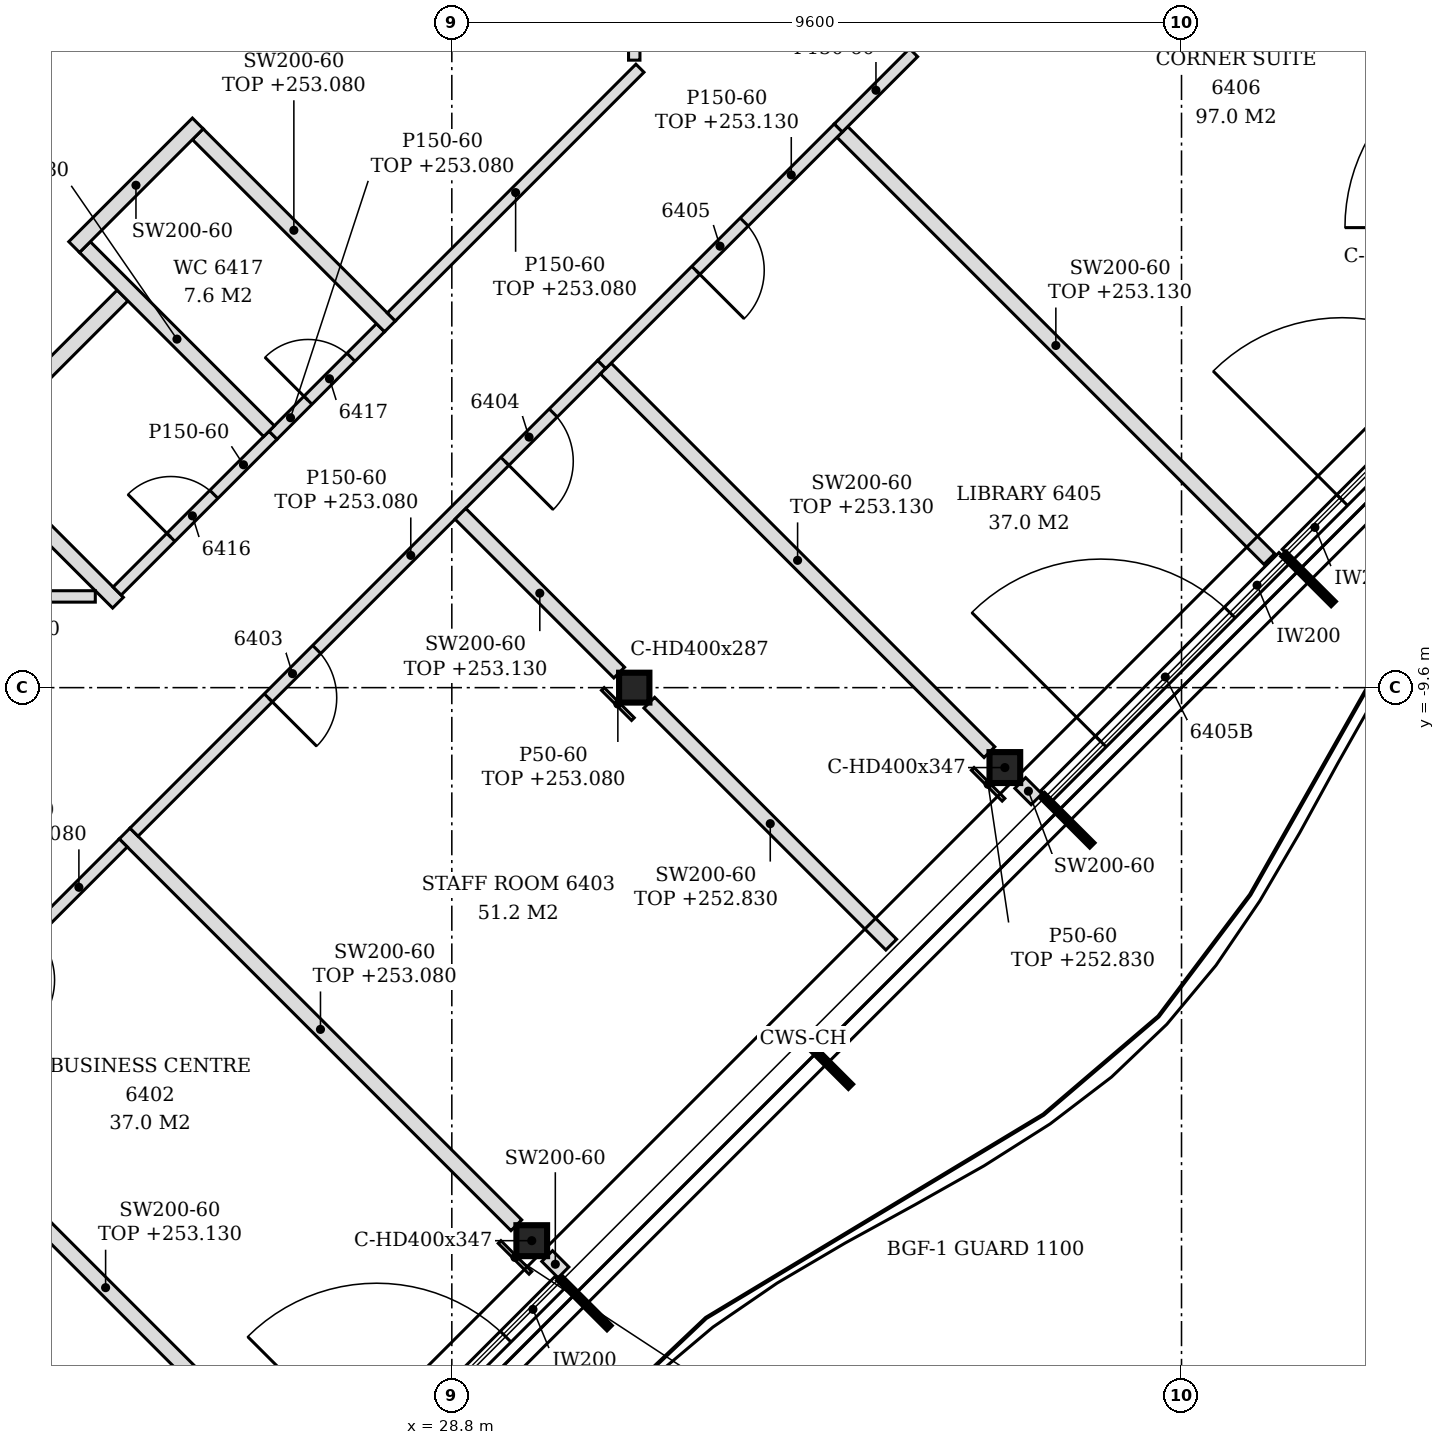
"""IFC4 building model, lengths in metres.
Left out: names, types, materials, properties, quantities, classifications, styles, units other than length and angle.
Written with IfcOpenShell. Run it as: python <this file> out.ifc"""

import sys

from ifc_helpers import new_model, si_unit, direction, frame, frame_2d, origin, origin_2d, place, context, subcontext, project, spatial, rectangle, i_section, extrude, element, fill, save


model = new_model("IFC4")
c1 = context("Model", 3, precision=1e-05, world=origin(), true_north=direction((0.0, 1.0)))
c2 = subcontext(c1, "Body", "Model", "MODEL_VIEW")
j1 = project(units=[si_unit("LENGTHUNIT", "METRE"), si_unit("PLANEANGLEUNIT", "RADIAN")], contexts=[c1])
p1 = place(None, origin())
s1 = spatial("IfcSite", under=j1, at=p1, CompositionType="ELEMENT")
p2 = place(p1, origin())
s2 = spatial("IfcBuilding", under=s1, at=p2, CompositionType="ELEMENT")
p3 = place(p2, frame((0.0, 0.0, 250.2)))
s3 = spatial("IfcBuildingStorey", under=s2, at=p3, CompositionType="ELEMENT", Elevation=250.2)
for number, where, z_axis, x_axis in (
    (1, (29.852, -16.876, -0.15), (0.0, 0.0, 1.0), (1.0, 0.0, 0.0)),
    (2, (36.076, -10.652, -0.15), (0.0, 0.0, 1.0), (1.0, 0.0, 0.0)),
):
    element("IfcColumn", number, at=place(p3, frame(where, z_axis=z_axis, x_axis=x_axis)), inside=s3, PredefinedType="COLUMN", context=c2, shape_type="SweptSolid", body=[
        extrude(i_section(OverallWidth=0.404, OverallDepth=0.407, WebThickness=0.027, FlangeThickness=0.044, FilletRadius=0.015, at=origin_2d()), origin(), (0.0, 0.0, 1.0), 3.6),
    ])
p4 = place(p3, frame((31.2, -9.6, -0.15), z_axis=(0.0, 0.0, 1.0), x_axis=(1.0, 0.0, 0.0)))
e3 = element("IfcColumn", 3, at=p4, inside=s3, PredefinedType="COLUMN", context=c2, shape_type="SweptSolid", body=[
    extrude(i_section(OverallWidth=0.399, OverallDepth=0.393, WebThickness=0.023, FlangeThickness=0.037, FilletRadius=0.015, at=origin_2d()), origin(), (0.0, 0.0, 1.0), 3.6),
])
p5 = place(p3, frame((27.093, -20.553, 0.0), z_axis=(0.0, 0.0, 1.0), x_axis=(0.707079231393, 0.707134329907, 0.0)))
e4 = element("IfcWall", 4, at=p5, inside=s3, PredefinedType="NOTDEFINED", context=c2, shape_type="SweptSolid", body=[
    extrude(rectangle(XDim=4.431, YDim=0.2, at=frame_2d((2.215, 0.0))), origin(), (0.0, 0.0, 1.0), 3.45),
])
p6 = place(p5, frame((1.015, 0.0, 0.0)))
e5 = element("IfcOpeningElement", 5, at=p6, cuts=e4, PredefinedType="OPENING", context=c2, shape_type="SweptSolid", body=[
    extrude(rectangle(XDim=2.4, YDim=2.4, at=frame_2d((1.2, 1.2))), frame((0.0, 0.11, 0.0), z_axis=(0.0, -1.0, 0.0), x_axis=(1.0, 0.0, 0.0)), (0.0, 0.0, 1.0), 0.22),
])
p7 = place(p3, frame((36.62, -11.026, 0.0), z_axis=(0.0, 0.0, 1.0), x_axis=(0.707106781187, 0.707106781187, 0.0)))
e6 = element("IfcWall", 6, at=p7, inside=s3, PredefinedType="NOTDEFINED", context=c2, shape_type="SweptSolid", body=[
    extrude(rectangle(XDim=4.431, YDim=0.2, at=frame_2d((2.215, 0.0))), origin(), (0.0, 0.0, 1.0), 3.45),
])
p8 = place(p7, frame((1.015, 0.0, 0.0)))
e7 = element("IfcOpeningElement", 7, at=p8, cuts=e6, PredefinedType="OPENING", context=c2, shape_type="SweptSolid", body=[
    extrude(rectangle(XDim=2.4, YDim=2.4, at=frame_2d((1.2, 1.2))), frame((0.0, 0.11, 0.0), z_axis=(0.0, -1.0, 0.0), x_axis=(1.0, 0.0, 0.0)), (0.0, 0.0, 1.0), 0.22),
])
p9 = place(p3, frame((39.796, -7.851, 0.0), z_axis=(0.0, 0.0, 1.0), x_axis=(0.707079168996, 0.707134392299, 0.0)))
e8 = element("IfcWall", 8, at=p9, inside=s3, PredefinedType="NOTDEFINED", context=c2, shape_type="SweptSolid", body=[
    extrude(rectangle(XDim=4.421, YDim=0.2, at=frame_2d((2.21, 0.0))), origin(), (0.0, 0.0, 1.0), 3.45),
])
p10 = place(p9, frame((1.016, 0.0, 0.0)))
e9 = element("IfcOpeningElement", 9, at=p10, cuts=e8, PredefinedType="OPENING", context=c2, shape_type="SweptSolid", body=[
    extrude(rectangle(XDim=2.4, YDim=2.4, at=frame_2d((1.2, 1.2))), frame((0.0, 0.11, 0.0), z_axis=(0.0, -1.0, 0.0), x_axis=(1.0, 0.0, 0.0)), (0.0, 0.0, 1.0), 0.22),
])
p11 = place(p3, frame((27.107, -20.355, 0.0), z_axis=(0.0, 0.0, 1.0), x_axis=(-0.707182179369, 0.707031374964, 0.0)))
e10 = element("IfcWall", 10, at=p11, inside=s3, PredefinedType="PARTITIONING", context=c2, shape_type="SweptSolid", body=[
    extrude(rectangle(XDim=8.095, YDim=0.2, at=frame_2d((4.047, 0.0))), origin(), (0.0, 0.0, 1.0), 2.93),
])
p12 = place(p3, frame((30.269, -17.293, 0.0), z_axis=(0.0, 0.0, 1.0), x_axis=(-0.707509117806, 0.706704215511, 0.0)))
e11 = element("IfcWall", 11, at=p12, inside=s3, PredefinedType="PARTITIONING", context=c2, shape_type="SweptSolid", body=[
    extrude(rectangle(XDim=0.303, YDim=0.2, at=frame_2d((0.152, 0.0))), origin(), (0.0, 0.0, 1.0), 3.45),
])
p13 = place(p3, frame((29.649, -16.673, 0.0), z_axis=(0.0, 0.0, 1.0), x_axis=(-0.707106781187, 0.707106781187, 0.0)))
e12 = element("IfcWall", 12, at=p13, inside=s3, PredefinedType="PARTITIONING", context=c2, shape_type="SweptSolid", body=[
    extrude(rectangle(XDim=7.289, YDim=0.2, at=frame_2d((3.644, 0.0))), origin(), (0.0, 0.0, 1.0), 2.88),
])
p14 = place(p3, frame((21.507, -14.614, 0.0), z_axis=(0.0, 0.0, 1.0), x_axis=(0.706990566745, 0.707222976531, 0.0)))
e13 = element("IfcWall", 13, at=p14, inside=s3, PredefinedType="PARTITIONING", context=c2, shape_type="SweptSolid", body=[
    extrude(rectangle(XDim=4.202, YDim=0.15, at=frame_2d((2.101, 0.0))), origin(), (0.0, 0.0, 1.0), 2.88),
])
p15 = place(p14, frame((1.651, 0.0, 0.0)))
e14 = element("IfcOpeningElement", 14, at=p15, cuts=e13, PredefinedType="OPENING", context=c2, shape_type="SweptSolid", body=[
    extrude(rectangle(XDim=0.9, YDim=2.1, at=frame_2d((0.45, 1.05))), frame((0.0, 0.085, 0.0), z_axis=(0.0, -1.0, 0.0), x_axis=(1.0, 0.0, 0.0)), (0.0, 0.0, 1.0), 0.17),
])
p16 = place(p3, frame((34.581, -12.981, 0.0), z_axis=(0.0, 0.0, 1.0), x_axis=(-0.707133900936, 0.707079660397, 0.0)))
e15 = element("IfcWall", 15, at=p16, inside=s3, PredefinedType="PARTITIONING", context=c2, shape_type="SweptSolid", body=[
    extrude(rectangle(XDim=4.501, YDim=0.2, at=frame_2d((2.25, 0.0))), origin(), (0.0, 0.0, 1.0), 2.63),
])
p17 = place(p3, frame((24.619, -11.501, 0.0), z_axis=(0.0, 0.0, 1.0), x_axis=(0.707106781187, 0.707106781187, 0.0)))
e16 = element("IfcWall", 16, at=p17, inside=s3, PredefinedType="PARTITIONING", context=c2, shape_type="SweptSolid", body=[
    extrude(rectangle(XDim=8.702, YDim=0.15, at=frame_2d((4.351, 0.0))), origin(), (0.0, 0.0, 1.0), 2.88),
])
p18 = place(p17, frame((2.499, 0.0, 0.0)))
e17 = element("IfcOpeningElement", 17, at=p18, cuts=e16, PredefinedType="OPENING", context=c2, shape_type="SweptSolid", body=[
    extrude(rectangle(XDim=0.9, YDim=2.1, at=frame_2d((0.45, 1.05))), frame((0.0, 0.085, 0.0), z_axis=(0.0, -1.0, 0.0), x_axis=(1.0, 0.0, 0.0)), (0.0, 0.0, 1.0), 0.17),
])
p19 = place(p17, frame((6.9, 0.0, 0.0)))
e18 = element("IfcOpeningElement", 18, at=p19, cuts=e16, PredefinedType="OPENING", context=c2, shape_type="SweptSolid", body=[
    extrude(rectangle(XDim=0.9, YDim=2.1, at=frame_2d((0.45, 1.05))), frame((0.0, 0.085, 0.0), z_axis=(0.0, -1.0, 0.0), x_axis=(1.0, 0.0, 0.0)), (0.0, 0.0, 1.0), 0.17),
])
p20 = place(p3, frame((36.493, -11.069, 0.0), z_axis=(0.0, 0.0, 1.0), x_axis=(-0.707106781187, 0.707106781187, 0.0)))
e19 = element("IfcWall", 19, at=p20, inside=s3, PredefinedType="PARTITIONING", context=c2, shape_type="SweptSolid", body=[
    extrude(rectangle(XDim=0.303, YDim=0.2, at=frame_2d((0.152, 0.0))), origin(), (0.0, 0.0, 1.0), 3.45),
])
p21 = place(p3, frame((35.873, -10.449, 0.0), z_axis=(0.0, 0.0, 1.0), x_axis=(-0.707089680867, 0.707123881093, 0.0)))
e20 = element("IfcWall", 20, at=p21, inside=s3, PredefinedType="PARTITIONING", context=c2, shape_type="SweptSolid", body=[
    extrude(rectangle(XDim=7.139, YDim=0.2, at=frame_2d((3.569, 0.0))), origin(), (0.0, 0.0, 1.0), 2.93),
])
p22 = place(p3, frame((31.002, -9.402, 0.0), z_axis=(0.0, 0.0, 1.0), x_axis=(-0.707065460118, 0.70714809984, 0.0)))
e21 = element("IfcWall", 21, at=p22, inside=s3, PredefinedType="PARTITIONING", context=c2, shape_type="SweptSolid", body=[
    extrude(rectangle(XDim=2.954, YDim=0.2, at=frame_2d((1.477, 0.0))), origin(), (0.0, 0.0, 1.0), 2.93),
])
p23 = place(p3, frame((24.408, -8.482, 0.0), z_axis=(0.0, 0.0, 1.0), x_axis=(-0.707061835578, 0.707151723938, 0.0)))
e22 = element("IfcWall", 22, at=p23, inside=s3, PredefinedType="PARTITIONING", context=c2, shape_type="SweptSolid", body=[
    extrude(rectangle(XDim=2.716, YDim=0.2, at=frame_2d((1.358, 0.0))), origin(), (0.0, 0.0, 1.0), 3.45),
])
p24 = place(p3, frame((21.215, -8.4, 0.0), z_axis=(0.0, 0.0, 1.0), x_axis=(1.0, 0.0, 0.0)))
e23 = element("IfcWall", 23, at=p24, inside=s3, PredefinedType="PARTITIONING", context=c2, shape_type="SweptSolid", body=[
    extrude(rectangle(XDim=2.895, YDim=0.15, at=frame_2d((1.447, 0.0))), origin(), (0.0, 0.0, 1.0), 3.45),
])
p25 = place(p3, frame((24.397, -8.329, 0.0), z_axis=(0.0, 0.0, 1.0), x_axis=(0.707275119896, 0.706938402391, 0.0)))
e24 = element("IfcWall", 24, at=p25, inside=s3, PredefinedType="PARTITIONING", context=c2, shape_type="SweptSolid", body=[
    extrude(rectangle(XDim=2.9, YDim=0.15, at=frame_2d((1.45, 0.0))), origin(), (0.0, 0.0, 1.0), 3.45),
])
p26 = place(p25, frame((1.0, 0.0, 0.0)))
e25 = element("IfcOpeningElement", 25, at=p26, cuts=e24, PredefinedType="OPENING", context=c2, shape_type="SweptSolid", body=[
    extrude(rectangle(XDim=0.8, YDim=2.1, at=frame_2d((0.4, 1.05))), frame((0.0, 0.085, 0.0), z_axis=(0.0, -1.0, 0.0), x_axis=(1.0, 0.0, 0.0)), (0.0, 0.0, 1.0), 0.17),
])
p27 = place(p3, frame((39.555, -7.907, 0.0), z_axis=(0.0, 0.0, 1.0), x_axis=(-0.707060685068, 0.7071528743, 0.0)))
e26 = element("IfcWall", 26, at=p27, inside=s3, PredefinedType="PARTITIONING", context=c2, shape_type="SweptSolid", body=[
    extrude(rectangle(XDim=7.945, YDim=0.2, at=frame_2d((3.972, 0.0))), origin(), (0.0, 0.0, 1.0), 2.93),
])
p28 = place(p3, frame((22.346, -6.562, 0.0), z_axis=(0.0, 0.0, 1.0), x_axis=(0.707269502796, 0.706944022123, 0.0)))
e27 = element("IfcWall", 27, at=p28, inside=s3, PredefinedType="PARTITIONING", context=c2, shape_type="SweptSolid", body=[
    extrude(rectangle(XDim=3.0, YDim=0.2, at=frame_2d((1.5, 0.0))), origin(), (0.0, 0.0, 1.0), 2.88),
])
p29 = place(p3, frame((26.448, -6.279, 0.0), z_axis=(0.0, 0.0, 1.0), x_axis=(0.707106781187, 0.707106781187, 0.0)))
e28 = element("IfcWall", 28, at=p29, inside=s3, PredefinedType="PARTITIONING", context=c2, shape_type="SweptSolid", body=[
    extrude(rectangle(XDim=2.0, YDim=0.15, at=frame_2d((1.0, 0.0))), origin(), (0.0, 0.0, 1.0), 2.88),
])
p30 = place(p29, frame((0.65, 0.0, 0.0)))
e29 = element("IfcOpeningElement", 29, at=p30, cuts=e28, PredefinedType="OPENING", context=c2, shape_type="SweptSolid", body=[
    extrude(rectangle(XDim=0.8, YDim=2.1, at=frame_2d((0.4, 1.05))), frame((0.0, 0.085, 0.0), z_axis=(0.0, -1.0, 0.0), x_axis=(1.0, 0.0, 0.0)), (0.0, 0.0, 1.0), 0.17),
])
p31 = place(p3, frame((26.395, -6.226, 0.0), z_axis=(0.0, 0.0, 1.0), x_axis=(-0.707106781187, 0.707106781187, 0.0)))
e30 = element("IfcWall", 30, at=p31, inside=s3, PredefinedType="PARTITIONING", context=c2, shape_type="SweptSolid", body=[
    extrude(rectangle(XDim=3.426, YDim=0.2, at=frame_2d((1.713, 0.0))), origin(), (0.0, 0.0, 1.0), 2.88),
])
p32 = place(p3, frame((30.772, -5.348, 0.0), z_axis=(0.0, 0.0, 1.0), x_axis=(0.70724543229, 0.706968102891, 0.0)))
e31 = element("IfcWall", 31, at=p32, inside=s3, PredefinedType="PARTITIONING", context=c2, shape_type="SweptSolid", body=[
    extrude(rectangle(XDim=4.402, YDim=0.15, at=frame_2d((2.201, 0.0))), origin(), (0.0, 0.0, 1.0), 2.93),
])
p33 = place(p32, frame((1.751, 0.0, 0.0)))
e32 = element("IfcOpeningElement", 32, at=p33, cuts=e31, PredefinedType="OPENING", context=c2, shape_type="SweptSolid", body=[
    extrude(rectangle(XDim=0.9, YDim=2.1, at=frame_2d((0.45, 1.05))), frame((0.0, 0.085, 0.0), z_axis=(0.0, -1.0, 0.0), x_axis=(1.0, 0.0, 0.0)), (0.0, 0.0, 1.0), 0.17),
])
p34 = place(p3, frame((27.986, -4.847, 0.0), z_axis=(0.0, 0.0, 1.0), x_axis=(-0.707106781187, 0.707106781187, 0.0)))
e33 = element("IfcWall", 33, at=p34, inside=s3, PredefinedType="PARTITIONING", context=c2, shape_type="SweptSolid", body=[
    extrude(rectangle(XDim=3.576, YDim=0.2, at=frame_2d((1.788, 0.0))), origin(), (0.0, 0.0, 1.0), 2.88),
])
p35 = place(p3, frame((28.004, -4.723, 0.0), z_axis=(0.0, 0.0, 1.0), x_axis=(0.706974860744, 0.707238677022, 0.0)))
e34 = element("IfcWall", 34, at=p35, inside=s3, PredefinedType="PARTITIONING", context=c2, shape_type="SweptSolid", body=[
    extrude(rectangle(XDim=4.627, YDim=0.15, at=frame_2d((2.313, 0.0))), origin(), (0.0, 0.0, 1.0), 2.88),
])
p36 = place(p3, frame((23.831, -3.804, 0.0), z_axis=(0.0, 0.0, 1.0), x_axis=(0.707106781187, 0.707106781187, 0.0)))
e35 = element("IfcWall", 35, at=p36, inside=s3, PredefinedType="PARTITIONING", context=c2, shape_type="SweptSolid", body=[
    extrude(rectangle(XDim=2.3, YDim=0.2, at=frame_2d((1.15, 0.0))), origin(), (0.0, 0.0, 1.0), 3.45),
])
p37 = place(p3, frame((33.885, -2.236, 0.0), z_axis=(0.0, 0.0, 1.0), x_axis=(0.707106781187, 0.707106781187, 0.0)))
e36 = element("IfcWall", 36, at=p37, inside=s3, PredefinedType="PARTITIONING", context=c2, shape_type="SweptSolid", body=[
    extrude(rectangle(XDim=1.4, YDim=0.15, at=frame_2d((0.7, 0.0))), origin(), (0.0, 0.0, 1.0), 3.45),
])
p38 = place(p3, frame((31.2, -1.345, 0.0), z_axis=(0.0, 0.0, 1.0), x_axis=(0.0, 1.0, 0.0)))
e37 = element("IfcWall", 37, at=p38, inside=s3, PredefinedType="PARTITIONING", context=c2, shape_type="SweptSolid", body=[
    extrude(rectangle(XDim=1.148, YDim=0.15, at=frame_2d((0.574, 0.0))), origin(), (0.0, 0.0, 1.0), 2.93),
])
p39 = place(p3, frame((29.834, -17.299, 0.0), z_axis=(0.0, 0.0, 1.0), x_axis=(-0.707106781187, 0.707106781187, 0.0)))
e38 = element("IfcWall", 38, at=p39, inside=s3, PredefinedType="PARTITIONING", context=c2, shape_type="SweptSolid", body=[
    extrude(rectangle(XDim=0.573, YDim=0.05, at=frame_2d((0.287, 0.0))), origin(), (0.0, 0.0, 1.0), 2.93),
])
p40 = place(p3, frame((31.182, -10.014, 0.0), z_axis=(0.0, 0.0, 1.0), x_axis=(-0.707106781187, 0.707106781187, 0.0)))
e39 = element("IfcWall", 39, at=p40, inside=s3, PredefinedType="PARTITIONING", context=c2, shape_type="SweptSolid", body=[
    extrude(rectangle(XDim=0.56, YDim=0.05, at=frame_2d((0.28, 0.0))), origin(), (0.0, 0.0, 1.0), 2.88),
])
p41 = place(p3, frame((36.058, -11.075, 0.0), z_axis=(0.0, 0.0, 1.0), x_axis=(-0.707106781187, 0.707106781187, 0.0)))
e40 = element("IfcWall", 40, at=p41, inside=s3, PredefinedType="PARTITIONING", context=c2, shape_type="SweptSolid", body=[
    extrude(rectangle(XDim=0.573, YDim=0.05, at=frame_2d((0.287, 0.0))), origin(), (0.0, 0.0, 1.0), 2.63),
])
p42 = place(p6, origin())
e41 = element("IfcDoor", 41, at=p42, inside=s3, OperationType="SINGLE_SWING_LEFT", PredefinedType="DOOR", context=c2, shape_type="SweptSolid", body=[
    extrude(rectangle(XDim=2.4, YDim=2.4, at=frame_2d((1.2, 1.2))), frame((0.0, 0.025, 0.0), z_axis=(0.0, -1.0, 0.0), x_axis=(1.0, 0.0, 0.0)), (0.0, 0.0, 1.0), 0.05),
])
fill(e5, e41)
p43 = place(p8, origin())
e42 = element("IfcDoor", 42, at=p43, inside=s3, OperationType="SINGLE_SWING_LEFT", PredefinedType="DOOR", context=c2, shape_type="SweptSolid", body=[
    extrude(rectangle(XDim=2.4, YDim=2.4, at=frame_2d((1.2, 1.2))), frame((0.0, 0.025, 0.0), z_axis=(0.0, -1.0, 0.0), x_axis=(1.0, 0.0, 0.0)), (0.0, 0.0, 1.0), 0.05),
])
fill(e7, e42)
p44 = place(p10, origin())
e43 = element("IfcDoor", 43, at=p44, inside=s3, OperationType="SINGLE_SWING_LEFT", PredefinedType="DOOR", context=c2, shape_type="SweptSolid", body=[
    extrude(rectangle(XDim=2.4, YDim=2.4, at=frame_2d((1.2, 1.2))), frame((0.0, 0.025, 0.0), z_axis=(0.0, -1.0, 0.0), x_axis=(1.0, 0.0, 0.0)), (0.0, 0.0, 1.0), 0.05),
])
fill(e9, e43)
p45 = place(p18, frame((0.9, 0.0, 0.0), z_axis=(0.0, 0.0, 1.0), x_axis=(-1.0, 0.0, 0.0)))
e44 = element("IfcDoor", 44, at=p45, inside=s3, OperationType="SINGLE_SWING_RIGHT", PredefinedType="DOOR", context=c2, shape_type="SweptSolid", body=[
    extrude(rectangle(XDim=0.9, YDim=2.1, at=frame_2d((0.45, 1.05))), frame((0.0, 0.025, 0.0), z_axis=(0.0, -1.0, 0.0), x_axis=(1.0, 0.0, 0.0)), (0.0, 0.0, 1.0), 0.05),
])
fill(e17, e44)
p46 = place(p19, frame((0.9, 0.0, 0.0), z_axis=(0.0, 0.0, 1.0), x_axis=(-1.0, 0.0, 0.0)))
e45 = element("IfcDoor", 45, at=p46, inside=s3, OperationType="SINGLE_SWING_RIGHT", PredefinedType="DOOR", context=c2, shape_type="SweptSolid", body=[
    extrude(rectangle(XDim=0.9, YDim=2.1, at=frame_2d((0.45, 1.05))), frame((0.0, 0.025, 0.0), z_axis=(0.0, -1.0, 0.0), x_axis=(1.0, 0.0, 0.0)), (0.0, 0.0, 1.0), 0.05),
])
fill(e18, e45)
p47 = place(p33, frame((0.9, 0.0, 0.0), z_axis=(0.0, 0.0, 1.0), x_axis=(-1.0, 0.0, 0.0)))
e46 = element("IfcDoor", 46, at=p47, inside=s3, OperationType="SINGLE_SWING_RIGHT", PredefinedType="DOOR", context=c2, shape_type="SweptSolid", body=[
    extrude(rectangle(XDim=0.9, YDim=2.1, at=frame_2d((0.45, 1.05))), frame((0.0, 0.025, 0.0), z_axis=(0.0, -1.0, 0.0), x_axis=(1.0, 0.0, 0.0)), (0.0, 0.0, 1.0), 0.05),
])
fill(e32, e46)
p48 = place(p26, origin())
e47 = element("IfcDoor", 47, at=p48, inside=s3, OperationType="SINGLE_SWING_LEFT", PredefinedType="DOOR", context=c2, shape_type="SweptSolid", body=[
    extrude(rectangle(XDim=0.8, YDim=2.1, at=frame_2d((0.4, 1.05))), frame((0.0, 0.025, 0.0), z_axis=(0.0, -1.0, 0.0), x_axis=(1.0, 0.0, 0.0)), (0.0, 0.0, 1.0), 0.05),
])
fill(e25, e47)
p49 = place(p30, origin())
e48 = element("IfcDoor", 48, at=p49, inside=s3, OperationType="SINGLE_SWING_LEFT", PredefinedType="DOOR", context=c2, shape_type="SweptSolid", body=[
    extrude(rectangle(XDim=0.8, YDim=2.1, at=frame_2d((0.4, 1.05))), frame((0.0, 0.025, 0.0), z_axis=(0.0, -1.0, 0.0), x_axis=(1.0, 0.0, 0.0)), (0.0, 0.0, 1.0), 0.05),
])
fill(e29, e48)
save(model, sys.argv[1])
